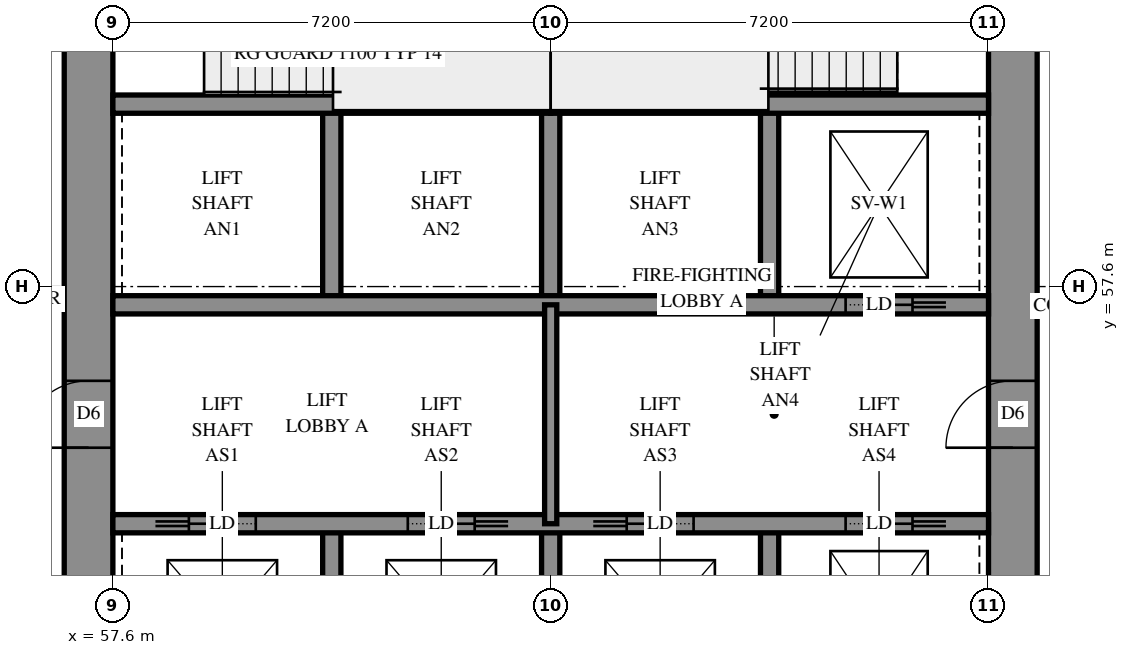
"""IFC4 building model, lengths in metres.
Left out: names, types, materials, properties, quantities, classifications, styles, units other than length and angle.
Written with IfcOpenShell. Run it as: python <this file> out.ifc"""

import sys

from ifc_helpers import new_model, si_unit, direction, frame, frame_2d, origin, place, context, subcontext, project, spatial, rectangle, extrude, element, fill, save


model = new_model("IFC4")
c1 = context("Model", 3, precision=1e-05, world=origin(), true_north=direction((0.0, 1.0)))
c2 = subcontext(c1, "Body", "Model", "MODEL_VIEW")
j1 = project(units=[si_unit("LENGTHUNIT", "METRE"), si_unit("PLANEANGLEUNIT", "RADIAN")], contexts=[c1])
p1 = place(None, origin())
s1 = spatial("IfcSite", under=j1, at=p1, CompositionType="ELEMENT")
p2 = place(p1, origin())
s2 = spatial("IfcBuilding", under=s1, at=p2, CompositionType="ELEMENT")
p3 = place(p2, frame((0.0, 0.0, 81.2)))
s3 = spatial("IfcBuildingStorey", under=s2, at=p3, CompositionType="ELEMENT", Elevation=81.2)
p4 = place(p3, frame((57.2, 50.4, -0.3), z_axis=(0.0, 0.0, 1.0), x_axis=(0.0, 1.0, 0.0)))
e1 = element("IfcWall", 1, at=p4, inside=s3, PredefinedType="SHEAR", context=c2, shape_type="SweptSolid", body=[
    extrude(rectangle(XDim=14.4, YDim=0.8, at=frame_2d((7.2, 0.0))), origin(), (0.0, 0.0, 1.0), 2.7),
])
p5 = place(p4, frame((4.55, 0.0, 0.3)))
e2 = element("IfcOpeningElement", 2, at=p5, cuts=e1, PredefinedType="OPENING", context=c2, shape_type="SweptSolid", body=[
    extrude(rectangle(XDim=1.1, YDim=2.1, at=frame_2d((0.55, 1.05))), frame((0.0, 0.41, 0.0), z_axis=(0.0, -1.0, 0.0), x_axis=(1.0, 0.0, 0.0)), (0.0, 0.0, 1.0), 0.82),
])
p6 = place(p4, frame((11.35, 0.0, 0.3)))
e3 = element("IfcOpeningElement", 3, at=p6, cuts=e1, PredefinedType="OPENING", context=c2, shape_type="SweptSolid", body=[
    extrude(rectangle(XDim=1.1, YDim=2.1, at=frame_2d((0.55, 1.05))), frame((0.0, 0.41, 0.0), z_axis=(0.0, -1.0, 0.0), x_axis=(1.0, 0.0, 0.0)), (0.0, 0.0, 1.0), 0.82),
])
p7 = place(p3, frame((72.4, 50.4, -0.3), z_axis=(0.0, 0.0, 1.0), x_axis=(0.0, 1.0, 0.0)))
e4 = element("IfcWall", 4, at=p7, inside=s3, PredefinedType="SHEAR", context=c2, shape_type="SweptSolid", body=[
    extrude(rectangle(XDim=14.4, YDim=0.8, at=frame_2d((7.2, 0.0))), origin(), (0.0, 0.0, 1.0), 2.7),
])
p8 = place(p7, frame((4.55, 0.0, 0.3)))
e5 = element("IfcOpeningElement", 5, at=p8, cuts=e4, PredefinedType="OPENING", context=c2, shape_type="SweptSolid", body=[
    extrude(rectangle(XDim=1.1, YDim=2.1, at=frame_2d((0.55, 1.05))), frame((0.0, 0.41, 0.0), z_axis=(0.0, -1.0, 0.0), x_axis=(1.0, 0.0, 0.0)), (0.0, 0.0, 1.0), 0.82),
])
p9 = place(p7, frame((11.35, 0.0, 0.3)))
e6 = element("IfcOpeningElement", 6, at=p9, cuts=e4, PredefinedType="OPENING", context=c2, shape_type="SweptSolid", body=[
    extrude(rectangle(XDim=1.1, YDim=2.1, at=frame_2d((0.55, 1.05))), frame((0.0, 0.41, 0.0), z_axis=(0.0, -1.0, 0.0), x_axis=(1.0, 0.0, 0.0)), (0.0, 0.0, 1.0), 0.82),
])
for number, where, z_axis, x_axis in (
    (7, (61.2, 50.4, 0.0), (0.0, 0.0, 1.0), (0.0, 1.0, 0.0)),
    (8, (61.2, 57.3, 0.0), (0.0, 0.0, 1.0), (0.0, 1.0, 0.0)),
    (9, (64.8, 50.4, 0.0), (0.0, 0.0, 1.0), (0.0, 1.0, 0.0)),
    (10, (64.8, 57.3, 0.0), (0.0, 0.0, 1.0), (0.0, 1.0, 0.0)),
    (11, (68.4, 50.4, 0.0), (0.0, 0.0, 1.0), (0.0, 1.0, 0.0)),
    (12, (68.4, 57.3, 0.0), (0.0, 0.0, 1.0), (0.0, 1.0, 0.0)),
):
    element("IfcWall", number, at=place(p3, frame(where, z_axis=z_axis, x_axis=x_axis)), inside=s3, PredefinedType="SOLIDWALL", context=c2, shape_type="SweptSolid", body=[
        extrude(rectangle(XDim=3.3, YDim=0.3, at=frame_2d((1.65, 0.0))), origin(), (0.0, 0.0, 1.0), 3.1),
    ])
p10 = place(p3, frame((57.6, 53.7, 0.0), z_axis=(0.0, 0.0, 1.0), x_axis=(1.0, 0.0, 0.0)))
e13 = element("IfcWall", 13, at=p10, inside=s3, PredefinedType="SOLIDWALL", context=c2, shape_type="SweptSolid", body=[
    extrude(rectangle(XDim=14.4, YDim=0.3, at=frame_2d((7.2, 0.0))), origin(), (0.0, 0.0, 1.0), 3.1),
])
p11 = place(p10, frame((1.25, 0.0, 0.0)))
e14 = element("IfcOpeningElement", 14, at=p11, cuts=e13, PredefinedType="OPENING", context=c2, shape_type="SweptSolid", body=[
    extrude(rectangle(XDim=1.1, YDim=2.1, at=frame_2d((0.55, 1.05))), frame((0.0, 0.16, 0.0), z_axis=(0.0, -1.0, 0.0), x_axis=(1.0, 0.0, 0.0)), (0.0, 0.0, 1.0), 0.32),
])
p12 = place(p10, frame((4.85, 0.0, 0.0)))
e15 = element("IfcOpeningElement", 15, at=p12, cuts=e13, PredefinedType="OPENING", context=c2, shape_type="SweptSolid", body=[
    extrude(rectangle(XDim=1.1, YDim=2.1, at=frame_2d((0.55, 1.05))), frame((0.0, 0.16, 0.0), z_axis=(0.0, -1.0, 0.0), x_axis=(1.0, 0.0, 0.0)), (0.0, 0.0, 1.0), 0.32),
])
p13 = place(p10, frame((8.45, 0.0, 0.0)))
e16 = element("IfcOpeningElement", 16, at=p13, cuts=e13, PredefinedType="OPENING", context=c2, shape_type="SweptSolid", body=[
    extrude(rectangle(XDim=1.1, YDim=2.1, at=frame_2d((0.55, 1.05))), frame((0.0, 0.16, 0.0), z_axis=(0.0, -1.0, 0.0), x_axis=(1.0, 0.0, 0.0)), (0.0, 0.0, 1.0), 0.32),
])
p14 = place(p10, frame((12.05, 0.0, 0.0)))
e17 = element("IfcOpeningElement", 17, at=p14, cuts=e13, PredefinedType="OPENING", context=c2, shape_type="SweptSolid", body=[
    extrude(rectangle(XDim=1.1, YDim=2.1, at=frame_2d((0.55, 1.05))), frame((0.0, 0.16, 0.0), z_axis=(0.0, -1.0, 0.0), x_axis=(1.0, 0.0, 0.0)), (0.0, 0.0, 1.0), 0.32),
])
p15 = place(p3, frame((57.6, 57.3, 0.0), z_axis=(0.0, 0.0, 1.0), x_axis=(1.0, 0.0, 0.0)))
e18 = element("IfcWall", 18, at=p15, inside=s3, PredefinedType="SOLIDWALL", context=c2, shape_type="SweptSolid", body=[
    extrude(rectangle(XDim=14.4, YDim=0.3, at=frame_2d((7.2, 0.0))), origin(), (0.0, 0.0, 1.0), 3.1),
])
p16 = place(p15, frame((12.05, 0.0, 0.0)))
e19 = element("IfcOpeningElement", 19, at=p16, cuts=e18, PredefinedType="OPENING", context=c2, shape_type="SweptSolid", body=[
    extrude(rectangle(XDim=1.1, YDim=2.1, at=frame_2d((0.55, 1.05))), frame((0.0, 0.16, 0.0), z_axis=(0.0, -1.0, 0.0), x_axis=(1.0, 0.0, 0.0)), (0.0, 0.0, 1.0), 0.32),
])
for number, where, z_axis, x_axis in (
    (20, (57.6, 60.6, 0.0), (0.0, 0.0, 1.0), (1.0, 0.0, 0.0)),
    (21, (64.8, 60.6, 0.0), (0.0, 0.0, 1.0), (1.0, 0.0, 0.0)),
):
    element("IfcWall", number, at=place(p3, frame(where, z_axis=z_axis, x_axis=x_axis)), inside=s3, PredefinedType="SOLIDWALL", context=c2, shape_type="SweptSolid", body=[
        extrude(rectangle(XDim=7.2, YDim=0.3, at=frame_2d((3.6, 0.0))), origin(), (0.0, 0.0, 1.0), 3.1),
    ])
p17 = place(p3, frame((64.8, 60.6, 0.0), z_axis=(0.0, 0.0, 1.0), x_axis=(0.0, 1.0, 0.0)))
e22 = element("IfcWall", 22, at=p17, inside=s3, PredefinedType="SOLIDWALL", context=c2, shape_type="SweptSolid", body=[
    extrude(rectangle(XDim=4.2, YDim=0.3, at=frame_2d((2.1, 0.0))), origin(), (0.0, 0.0, 1.0), 3.1),
])
p18 = place(p3, frame((64.8, 53.7, 0.0), z_axis=(0.0, 0.0, 1.0), x_axis=(0.0, 1.0, 0.0)))
e23 = element("IfcWall", 23, at=p18, inside=s3, PredefinedType="PARTITIONING", context=c2, shape_type="SweptSolid", body=[
    extrude(rectangle(XDim=3.6, YDim=0.2, at=frame_2d((1.8, 0.0))), origin(), (0.0, 0.0, 1.0), 3.1),
])
p19 = place(p5, origin())
e24 = element("IfcDoor", 24, at=p19, inside=s3, OperationType="DOUBLE_DOOR_SINGLE_SWING", PredefinedType="DOOR", context=c2, shape_type="SweptSolid", body=[
    extrude(rectangle(XDim=1.1, YDim=2.1, at=frame_2d((0.55, 1.05))), frame((0.0, 0.025, 0.0), z_axis=(0.0, -1.0, 0.0), x_axis=(1.0, 0.0, 0.0)), (0.0, 0.0, 1.0), 0.05),
])
fill(e2, e24)
p20 = place(p8, origin())
e25 = element("IfcDoor", 25, at=p20, inside=s3, OperationType="DOUBLE_DOOR_SINGLE_SWING", PredefinedType="DOOR", context=c2, shape_type="SweptSolid", body=[
    extrude(rectangle(XDim=1.1, YDim=2.1, at=frame_2d((0.55, 1.05))), frame((0.0, 0.025, 0.0), z_axis=(0.0, -1.0, 0.0), x_axis=(1.0, 0.0, 0.0)), (0.0, 0.0, 1.0), 0.05),
])
fill(e5, e25)
p21 = place(p11, origin())
e26 = element("IfcDoor", 26, at=p21, inside=s3, OperationType="SLIDING_TO_LEFT", PredefinedType="DOOR", context=c2, shape_type="SweptSolid", body=[
    extrude(rectangle(XDim=1.1, YDim=2.1, at=frame_2d((0.55, 1.05))), frame((0.0, 0.025, 0.0), z_axis=(0.0, -1.0, 0.0), x_axis=(1.0, 0.0, 0.0)), (0.0, 0.0, 1.0), 0.05),
])
fill(e14, e26)
p22 = place(p12, origin())
e27 = element("IfcDoor", 27, at=p22, inside=s3, OperationType="SLIDING_TO_RIGHT", PredefinedType="DOOR", context=c2, shape_type="SweptSolid", body=[
    extrude(rectangle(XDim=1.1, YDim=2.1, at=frame_2d((0.55, 1.05))), frame((0.0, 0.025, 0.0), z_axis=(0.0, -1.0, 0.0), x_axis=(1.0, 0.0, 0.0)), (0.0, 0.0, 1.0), 0.05),
])
fill(e15, e27)
p23 = place(p13, origin())
e28 = element("IfcDoor", 28, at=p23, inside=s3, OperationType="SLIDING_TO_LEFT", PredefinedType="DOOR", context=c2, shape_type="SweptSolid", body=[
    extrude(rectangle(XDim=1.1, YDim=2.1, at=frame_2d((0.55, 1.05))), frame((0.0, 0.025, 0.0), z_axis=(0.0, -1.0, 0.0), x_axis=(1.0, 0.0, 0.0)), (0.0, 0.0, 1.0), 0.05),
])
fill(e16, e28)
p24 = place(p14, origin())
e29 = element("IfcDoor", 29, at=p24, inside=s3, OperationType="SLIDING_TO_RIGHT", PredefinedType="DOOR", context=c2, shape_type="SweptSolid", body=[
    extrude(rectangle(XDim=1.1, YDim=2.1, at=frame_2d((0.55, 1.05))), frame((0.0, 0.025, 0.0), z_axis=(0.0, -1.0, 0.0), x_axis=(1.0, 0.0, 0.0)), (0.0, 0.0, 1.0), 0.05),
])
fill(e17, e29)
p25 = place(p16, origin())
e30 = element("IfcDoor", 30, at=p25, inside=s3, OperationType="SLIDING_TO_RIGHT", PredefinedType="DOOR", context=c2, shape_type="SweptSolid", body=[
    extrude(rectangle(XDim=1.1, YDim=2.1, at=frame_2d((0.55, 1.05))), frame((0.0, 0.025, 0.0), z_axis=(0.0, -1.0, 0.0), x_axis=(1.0, 0.0, 0.0)), (0.0, 0.0, 1.0), 0.05),
])
fill(e19, e30)
save(model, sys.argv[1])
